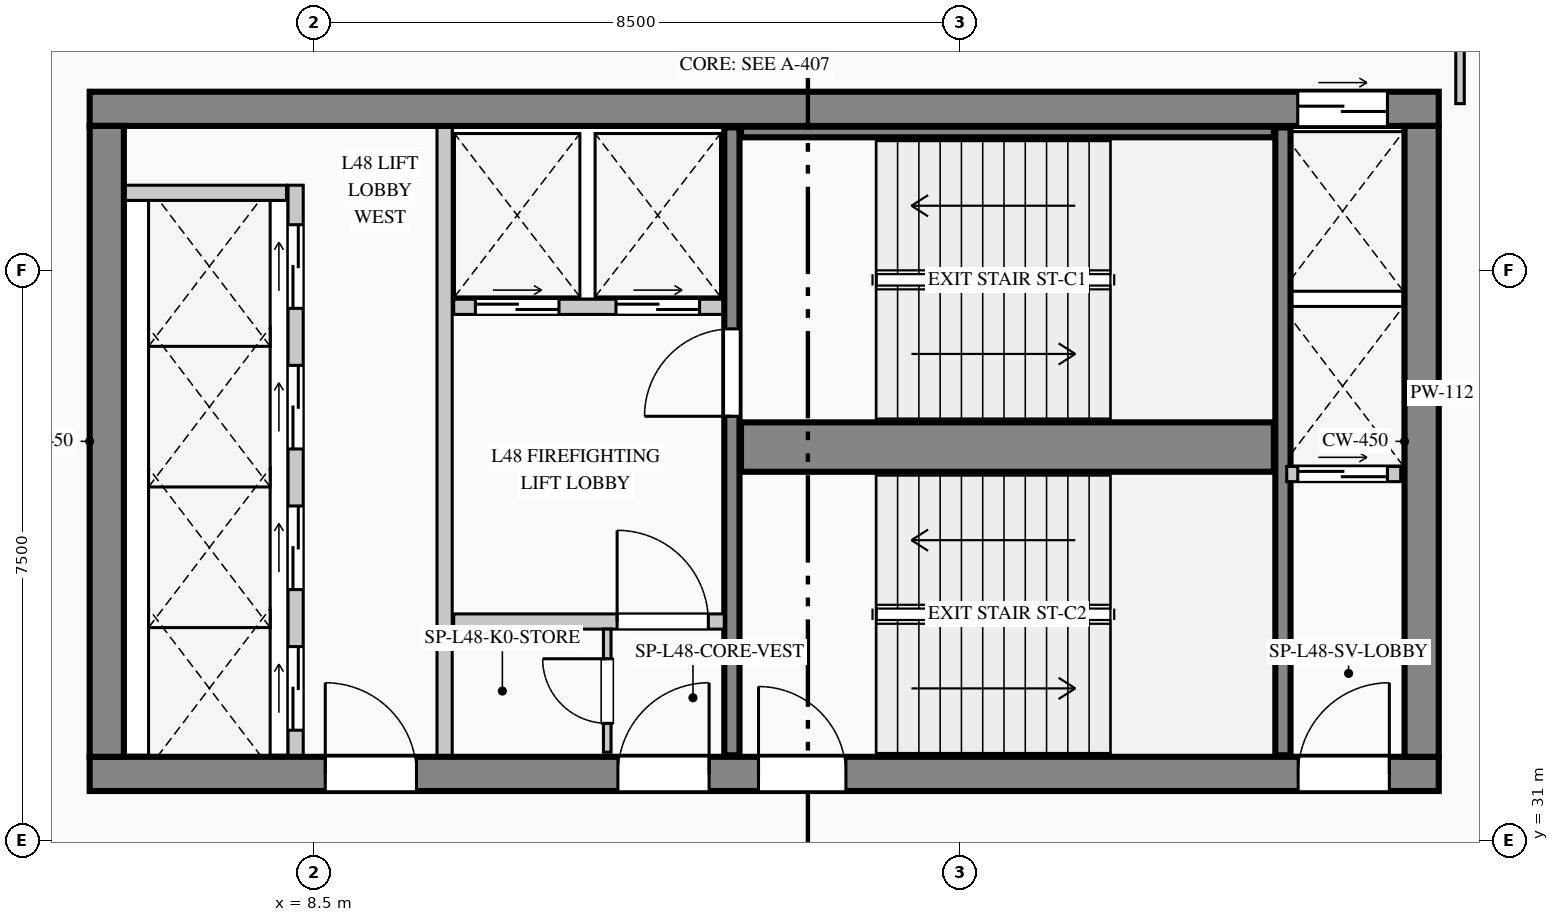
"""IFC4 building model, lengths in metres.
Left out: names, types, materials, properties, quantities, classifications, styles, units other than length and angle.
Written with IfcOpenShell. Run it as: python <this file> out.ifc"""

import sys

from ifc_helpers import new_model, si_unit, direction, frame, frame_2d, origin, place, context, subcontext, project, spatial, rectangle, extrude, element, fill, save


model = new_model("IFC4")
c1 = context("Model", 3, precision=1e-05, world=origin(), true_north=direction((0.0, 1.0)))
c2 = subcontext(c1, "Body", "Model", "MODEL_VIEW")
j1 = project(units=[si_unit("LENGTHUNIT", "METRE"), si_unit("PLANEANGLEUNIT", "RADIAN")], contexts=[c1])
p1 = place(None, origin())
s1 = spatial("IfcSite", under=j1, at=p1, CompositionType="ELEMENT")
p2 = place(p1, origin())
s2 = spatial("IfcBuilding", under=s1, at=p2, CompositionType="ELEMENT")
p3 = place(p2, frame((0.0, 0.0, 203.5)))
s3 = spatial("IfcBuildingStorey", under=s2, at=p3, CompositionType="ELEMENT", Elevation=203.5)
p4 = place(p3, frame((5.55, 40.625, 0.0), z_axis=(0.0, 0.0, 1.0), x_axis=(1.0, 0.0, 0.0)))
e1 = element("IfcWall", 1, at=p4, inside=s3, PredefinedType="SHEAR", context=c2, shape_type="SweptSolid", body=[
    extrude(rectangle(XDim=17.75, YDim=0.45, at=frame_2d((8.875, 0.0))), origin(), (0.0, 0.0, 1.0), 3.95),
])
p5 = place(p4, frame((15.895, 0.0, 0.0)))
e2 = element("IfcOpeningElement", 2, at=p5, cuts=e1, PredefinedType="OPENING", context=c2, shape_type="SweptSolid", body=[
    extrude(rectangle(XDim=1.18, YDim=2.25, at=frame_2d((0.59, 1.125))), frame((0.0, 0.235, 0.0), z_axis=(0.0, -1.0, 0.0), x_axis=(1.0, 0.0, 0.0)), (0.0, 0.0, 1.0), 0.47),
])
p6 = place(p3, frame((5.55, 31.875, 0.0), z_axis=(0.0, 0.0, 1.0), x_axis=(1.0, 0.0, 0.0)))
e3 = element("IfcWall", 3, at=p6, inside=s3, PredefinedType="SHEAR", context=c2, shape_type="SweptSolid", body=[
    extrude(rectangle(XDim=17.75, YDim=0.45, at=frame_2d((8.875, 0.0))), origin(), (0.0, 0.0, 1.0), 3.95),
])
p7 = place(p6, frame((3.1, 0.0, 0.0)))
e4 = element("IfcOpeningElement", 4, at=p7, cuts=e3, PredefinedType="OPENING", context=c2, shape_type="SweptSolid", body=[
    extrude(rectangle(XDim=1.2, YDim=2.2, at=frame_2d((0.6, 1.1))), frame((0.0, 0.235, 0.0), z_axis=(0.0, -1.0, 0.0), x_axis=(1.0, 0.0, 0.0)), (0.0, 0.0, 1.0), 0.47),
])
p8 = place(p6, frame((6.95, 0.0, 0.0)))
e5 = element("IfcOpeningElement", 5, at=p8, cuts=e3, PredefinedType="OPENING", context=c2, shape_type="SweptSolid", body=[
    extrude(rectangle(XDim=1.2, YDim=2.2, at=frame_2d((0.6, 1.1))), frame((0.0, 0.235, 0.0), z_axis=(0.0, -1.0, 0.0), x_axis=(1.0, 0.0, 0.0)), (0.0, 0.0, 1.0), 0.47),
])
p9 = place(p6, frame((8.8, 0.0, 0.0)))
e6 = element("IfcOpeningElement", 6, at=p9, cuts=e3, PredefinedType="OPENING", context=c2, shape_type="SweptSolid", body=[
    extrude(rectangle(XDim=1.15, YDim=2.2, at=frame_2d((0.575, 1.1))), frame((0.0, 0.235, 0.0), z_axis=(0.0, -1.0, 0.0), x_axis=(1.0, 0.0, 0.0)), (0.0, 0.0, 1.0), 0.47),
])
p10 = place(p6, frame((15.9, 0.0, 0.0)))
e7 = element("IfcOpeningElement", 7, at=p10, cuts=e3, PredefinedType="OPENING", context=c2, shape_type="SweptSolid", body=[
    extrude(rectangle(XDim=1.2, YDim=2.2, at=frame_2d((0.6, 1.1))), frame((0.0, 0.235, 0.0), z_axis=(0.0, -1.0, 0.0), x_axis=(1.0, 0.0, 0.0)), (0.0, 0.0, 1.0), 0.47),
])
for number, where, z_axis, x_axis in (
    (8, (5.775, 32.1, 0.0), (0.0, 0.0, 1.0), (0.0, 1.0, 0.0)),
    (9, (23.075, 32.1, 0.0), (0.0, 0.0, 1.0), (0.0, 1.0, 0.0)),
):
    element("IfcWall", number, at=place(p3, frame(where, z_axis=z_axis, x_axis=x_axis)), inside=s3, PredefinedType="SHEAR", context=c2, shape_type="SweptSolid", body=[
        extrude(rectangle(XDim=8.3, YDim=0.45, at=frame_2d((4.15, 0.0))), origin(), (0.0, 0.0, 1.0), 3.95),
    ])
p11 = place(p3, frame((14.0, 32.12, 0.0), z_axis=(0.0, 0.0, 1.0), x_axis=(0.0, 1.0, 0.0)))
e10 = element("IfcWall", 10, at=p11, inside=s3, PredefinedType="SHEAR", context=c2, shape_type="SweptSolid", body=[
    extrude(rectangle(XDim=8.26, YDim=0.2, at=frame_2d((4.13, 0.0))), origin(), (0.0, 0.0, 1.0), 3.95),
])
p12 = place(p11, frame((4.46, 0.0, 0.0)))
e11 = element("IfcOpeningElement", 11, at=p12, cuts=e10, PredefinedType="OPENING", context=c2, shape_type="SweptSolid", body=[
    extrude(rectangle(XDim=1.15, YDim=2.2, at=frame_2d((0.575, 1.1))), frame((0.0, 0.11, 0.0), z_axis=(0.0, -1.0, 0.0), x_axis=(1.0, 0.0, 0.0)), (0.0, 0.0, 1.0), 0.22),
])
p13 = place(p3, frame((14.12, 36.175, 0.0), z_axis=(0.0, 0.0, 1.0), x_axis=(1.0, 0.0, 0.0)))
e12 = element("IfcWall", 12, at=p13, inside=s3, PredefinedType="SHEAR", context=c2, shape_type="SweptSolid", body=[
    extrude(rectangle(XDim=7.01, YDim=0.65, at=frame_2d((3.505, 0.0))), origin(), (0.0, 0.0, 1.0), 3.95),
])
p14 = place(p3, frame((21.25, 32.12, 0.0), z_axis=(0.0, 0.0, 1.0), x_axis=(0.0, 1.0, 0.0)))
e13 = element("IfcWall", 13, at=p14, inside=s3, PredefinedType="SHEAR", context=c2, shape_type="SweptSolid", body=[
    extrude(rectangle(XDim=8.26, YDim=0.2, at=frame_2d((4.13, 0.0))), origin(), (0.0, 0.0, 1.0), 3.95),
])
p15 = place(p3, frame((14.12, 40.32, 0.0), z_axis=(0.0, 0.0, 1.0), x_axis=(1.0, 0.0, 0.0)))
e14 = element("IfcWall", 14, at=p15, inside=s3, PredefinedType="SHEAR", context=c2, shape_type="SweptSolid", body=[
    extrude(rectangle(XDim=7.01, YDim=0.14, at=frame_2d((3.505, 0.0))), origin(), (0.0, 0.0, 1.0), 3.95),
])
p16 = place(p3, frame((7.469, 4.63, 0.0), z_axis=(0.0, 0.0, 1.0), x_axis=(-0.123515300309, 0.992342667928, 0.0)))
e15 = element("IfcWall", 15, at=p16, inside=s3, PredefinedType="STANDARD", context=c2, shape_type="SweptSolid", body=[
    extrude(rectangle(XDim=37.024, YDim=0.26, at=frame_2d((18.512, 0.0))), origin(), (0.0, 0.0, 1.0), 3.7),
])
p17 = place(p16, frame((11.978, 0.0, 0.9)))
e16 = element("IfcOpeningElement", 16, at=p17, cuts=e15, PredefinedType="OPENING", context=c2, shape_type="SweptSolid", body=[
    extrude(rectangle(XDim=2.7, YDim=2.1, at=frame_2d((1.35, 1.05))), frame((0.0, 0.14, 0.0), z_axis=(0.0, -1.0, 0.0), x_axis=(1.0, 0.0, 0.0)), (0.0, 0.0, 1.0), 0.28),
])
p18 = place(p3, frame((8.26, 32.12, 0.0), z_axis=(0.0, 0.0, 1.0), x_axis=(0.0, 1.0, 0.0)))
e17 = element("IfcWall", 17, at=p18, inside=s3, PredefinedType="PARTITIONING", context=c2, shape_type="SweptSolid", body=[
    extrude(rectangle(XDim=7.5, YDim=0.2, at=frame_2d((3.75, 0.0))), origin(), (0.0, 0.0, 1.0), 3.7),
])
p19 = place(p18, frame((0.33, 0.0, 0.0)))
e18 = element("IfcOpeningElement", 18, at=p19, cuts=e17, PredefinedType="OPENING", context=c2, shape_type="SweptSolid", body=[
    extrude(rectangle(XDim=1.1, YDim=2.2, at=frame_2d((0.55, 1.1))), frame((0.0, 0.11, 0.0), z_axis=(0.0, -1.0, 0.0), x_axis=(1.0, 0.0, 0.0)), (0.0, 0.0, 1.0), 0.22),
])
p20 = place(p18, frame((2.18, 0.0, 0.0)))
e19 = element("IfcOpeningElement", 19, at=p20, cuts=e17, PredefinedType="OPENING", context=c2, shape_type="SweptSolid", body=[
    extrude(rectangle(XDim=1.1, YDim=2.2, at=frame_2d((0.55, 1.1))), frame((0.0, 0.11, 0.0), z_axis=(0.0, -1.0, 0.0), x_axis=(1.0, 0.0, 0.0)), (0.0, 0.0, 1.0), 0.22),
])
p21 = place(p18, frame((4.03, 0.0, 0.0)))
e20 = element("IfcOpeningElement", 20, at=p21, cuts=e17, PredefinedType="OPENING", context=c2, shape_type="SweptSolid", body=[
    extrude(rectangle(XDim=1.1, YDim=2.2, at=frame_2d((0.55, 1.1))), frame((0.0, 0.11, 0.0), z_axis=(0.0, -1.0, 0.0), x_axis=(1.0, 0.0, 0.0)), (0.0, 0.0, 1.0), 0.22),
])
p22 = place(p18, frame((5.88, 0.0, 0.0)))
e21 = element("IfcOpeningElement", 21, at=p22, cuts=e17, PredefinedType="OPENING", context=c2, shape_type="SweptSolid", body=[
    extrude(rectangle(XDim=1.1, YDim=2.2, at=frame_2d((0.55, 1.1))), frame((0.0, 0.11, 0.0), z_axis=(0.0, -1.0, 0.0), x_axis=(1.0, 0.0, 0.0)), (0.0, 0.0, 1.0), 0.22),
])
p23 = place(p3, frame((6.02, 39.52, 0.0), z_axis=(0.0, 0.0, 1.0), x_axis=(1.0, 0.0, 0.0)))
e22 = element("IfcWall", 22, at=p23, inside=s3, PredefinedType="PARTITIONING", context=c2, shape_type="SweptSolid", body=[
    extrude(rectangle(XDim=2.12, YDim=0.2, at=frame_2d((1.06, 0.0))), origin(), (0.0, 0.0, 1.0), 3.7),
])
p24 = place(p3, frame((10.22, 32.12, 0.0), z_axis=(0.0, 0.0, 1.0), x_axis=(0.0, 1.0, 0.0)))
e23 = element("IfcWall", 23, at=p24, inside=s3, PredefinedType="PARTITIONING", context=c2, shape_type="SweptSolid", body=[
    extrude(rectangle(XDim=8.26, YDim=0.2, at=frame_2d((4.13, 0.0))), origin(), (0.0, 0.0, 1.0), 3.7),
])
p25 = place(p3, frame((10.34, 38.02, 0.0), z_axis=(0.0, 0.0, 1.0), x_axis=(1.0, 0.0, 0.0)))
e24 = element("IfcWall", 24, at=p25, inside=s3, PredefinedType="PARTITIONING", context=c2, shape_type="SweptSolid", body=[
    extrude(rectangle(XDim=3.54, YDim=0.2, at=frame_2d((1.77, 0.0))), origin(), (0.0, 0.0, 1.0), 3.7),
])
p26 = place(p25, frame((0.285, 0.0, 0.0)))
e25 = element("IfcOpeningElement", 25, at=p26, cuts=e24, PredefinedType="OPENING", context=c2, shape_type="SweptSolid", body=[
    extrude(rectangle(XDim=1.1, YDim=2.2, at=frame_2d((0.55, 1.1))), frame((0.0, 0.11, 0.0), z_axis=(0.0, -1.0, 0.0), x_axis=(1.0, 0.0, 0.0)), (0.0, 0.0, 1.0), 0.22),
])
p27 = place(p25, frame((2.135, 0.0, 0.0)))
e26 = element("IfcOpeningElement", 26, at=p27, cuts=e24, PredefinedType="OPENING", context=c2, shape_type="SweptSolid", body=[
    extrude(rectangle(XDim=1.1, YDim=2.2, at=frame_2d((0.55, 1.1))), frame((0.0, 0.11, 0.0), z_axis=(0.0, -1.0, 0.0), x_axis=(1.0, 0.0, 0.0)), (0.0, 0.0, 1.0), 0.22),
])
p28 = place(p3, frame((10.34, 33.88, 0.0), z_axis=(0.0, 0.0, 1.0), x_axis=(1.0, 0.0, 0.0)))
e27 = element("IfcWall", 27, at=p28, inside=s3, PredefinedType="PARTITIONING", context=c2, shape_type="SweptSolid", body=[
    extrude(rectangle(XDim=3.56, YDim=0.2, at=frame_2d((1.78, 0.0))), origin(), (0.0, 0.0, 1.0), 3.7),
])
p29 = place(p28, frame((2.15, 0.0, 0.0)))
e28 = element("IfcOpeningElement", 28, at=p29, cuts=e27, PredefinedType="OPENING", context=c2, shape_type="SweptSolid", body=[
    extrude(rectangle(XDim=1.2, YDim=2.2, at=frame_2d((0.6, 1.1))), frame((0.0, 0.11, 0.0), z_axis=(0.0, -1.0, 0.0), x_axis=(1.0, 0.0, 0.0)), (0.0, 0.0, 1.0), 0.22),
])
p30 = place(p3, frame((12.36, 32.16, 0.0), z_axis=(0.0, 0.0, 1.0), x_axis=(0.0, 1.0, 0.0)))
e29 = element("IfcWall", 29, at=p30, inside=s3, PredefinedType="PARTITIONING", context=c2, shape_type="SweptSolid", body=[
    extrude(rectangle(XDim=1.62, YDim=0.1, at=frame_2d((0.81, 0.0))), origin(), (0.0, 0.0, 1.0), 3.7),
])
p31 = place(p30, frame((0.38, 0.0, 0.0)))
e30 = element("IfcOpeningElement", 30, at=p31, cuts=e29, PredefinedType="OPENING", context=c2, shape_type="SweptSolid", body=[
    extrude(rectangle(XDim=0.85, YDim=2.1, at=frame_2d((0.425, 1.05))), frame((0.0, 0.06, 0.0), z_axis=(0.0, -1.0, 0.0), x_axis=(1.0, 0.0, 0.0)), (0.0, 0.0, 1.0), 0.12),
])
p32 = place(p3, frame((21.3, 35.82, 0.0), z_axis=(0.0, 0.0, 1.0), x_axis=(1.0, 0.0, 0.0)))
e31 = element("IfcWall", 31, at=p32, inside=s3, PredefinedType="PARTITIONING", context=c2, shape_type="SweptSolid", body=[
    extrude(rectangle(XDim=1.5, YDim=0.2, at=frame_2d((0.75, 0.0))), origin(), (0.0, 0.0, 1.0), 3.7),
])
p33 = place(p32, frame((0.145, 0.0, 0.0)))
e32 = element("IfcOpeningElement", 32, at=p33, cuts=e31, PredefinedType="OPENING", context=c2, shape_type="SweptSolid", body=[
    extrude(rectangle(XDim=1.18, YDim=2.25, at=frame_2d((0.59, 1.125))), frame((0.0, 0.11, 0.0), z_axis=(0.0, -1.0, 0.0), x_axis=(1.0, 0.0, 0.0)), (0.0, 0.0, 1.0), 0.22),
])
p34 = place(p3, frame((23.58, 40.693, 0.0), z_axis=(0.0, 0.0, 1.0), x_axis=(0.0, 1.0, 0.0)))
e33 = element("IfcWall", 33, at=p34, inside=s3, PredefinedType="PARTITIONING", context=c2, shape_type="SweptSolid", body=[
    extrude(rectangle(XDim=2.542, YDim=0.112, at=frame_2d((1.271, 0.0))), origin(), (0.0, 0.0, 1.0), 3.7),
])
p35 = place(p7, origin())
e34 = element("IfcDoor", 34, at=p35, inside=s3, OperationType="SINGLE_SWING_LEFT", PredefinedType="DOOR", context=c2, shape_type="SweptSolid", body=[
    extrude(rectangle(XDim=1.2, YDim=2.2, at=frame_2d((0.6, 1.1))), frame((0.0, 0.025, 0.0), z_axis=(0.0, -1.0, 0.0), x_axis=(1.0, 0.0, 0.0)), (0.0, 0.0, 1.0), 0.05),
])
fill(e4, e34)
p36 = place(p8, origin())
e35 = element("IfcDoor", 35, at=p36, inside=s3, OperationType="SINGLE_SWING_RIGHT", PredefinedType="DOOR", context=c2, shape_type="SweptSolid", body=[
    extrude(rectangle(XDim=1.2, YDim=2.2, at=frame_2d((0.6, 1.1))), frame((0.0, 0.025, 0.0), z_axis=(0.0, -1.0, 0.0), x_axis=(1.0, 0.0, 0.0)), (0.0, 0.0, 1.0), 0.05),
])
fill(e5, e35)
p37 = place(p9, origin())
e36 = element("IfcDoor", 36, at=p37, inside=s3, OperationType="SINGLE_SWING_LEFT", PredefinedType="DOOR", context=c2, shape_type="SweptSolid", body=[
    extrude(rectangle(XDim=1.15, YDim=2.2, at=frame_2d((0.575, 1.1))), frame((0.0, 0.025, 0.0), z_axis=(0.0, -1.0, 0.0), x_axis=(1.0, 0.0, 0.0)), (0.0, 0.0, 1.0), 0.05),
])
fill(e6, e36)
p38 = place(p10, origin())
e37 = element("IfcDoor", 37, at=p38, inside=s3, OperationType="SINGLE_SWING_RIGHT", PredefinedType="DOOR", context=c2, shape_type="SweptSolid", body=[
    extrude(rectangle(XDim=1.2, YDim=2.2, at=frame_2d((0.6, 1.1))), frame((0.0, 0.025, 0.0), z_axis=(0.0, -1.0, 0.0), x_axis=(1.0, 0.0, 0.0)), (0.0, 0.0, 1.0), 0.05),
])
fill(e7, e37)
p39 = place(p29, origin())
e38 = element("IfcDoor", 38, at=p39, inside=s3, OperationType="SINGLE_SWING_LEFT", PredefinedType="DOOR", context=c2, shape_type="SweptSolid", body=[
    extrude(rectangle(XDim=1.2, YDim=2.2, at=frame_2d((0.6, 1.1))), frame((0.0, 0.025, 0.0), z_axis=(0.0, -1.0, 0.0), x_axis=(1.0, 0.0, 0.0)), (0.0, 0.0, 1.0), 0.05),
])
fill(e28, e38)
p40 = place(p31, origin())
e39 = element("IfcDoor", 39, at=p40, inside=s3, OperationType="SINGLE_SWING_RIGHT", PredefinedType="DOOR", context=c2, shape_type="SweptSolid", body=[
    extrude(rectangle(XDim=0.85, YDim=2.1, at=frame_2d((0.425, 1.05))), frame((0.0, 0.025, 0.0), z_axis=(0.0, -1.0, 0.0), x_axis=(1.0, 0.0, 0.0)), (0.0, 0.0, 1.0), 0.05),
])
fill(e30, e39)
p41 = place(p12, origin())
e40 = element("IfcDoor", 40, at=p41, inside=s3, OperationType="SINGLE_SWING_LEFT", PredefinedType="DOOR", context=c2, shape_type="SweptSolid", body=[
    extrude(rectangle(XDim=1.15, YDim=2.2, at=frame_2d((0.575, 1.1))), frame((0.0, 0.025, 0.0), z_axis=(0.0, -1.0, 0.0), x_axis=(1.0, 0.0, 0.0)), (0.0, 0.0, 1.0), 0.05),
])
fill(e11, e40)
p42 = place(p19, origin())
e41 = element("IfcDoor", 41, at=p42, inside=s3, OperationType="DOUBLE_DOOR_SLIDING", PredefinedType="DOOR", context=c2, shape_type="SweptSolid", body=[
    extrude(rectangle(XDim=1.1, YDim=2.2, at=frame_2d((0.55, 1.1))), frame((0.0, 0.025, 0.0), z_axis=(0.0, -1.0, 0.0), x_axis=(1.0, 0.0, 0.0)), (0.0, 0.0, 1.0), 0.05),
])
fill(e18, e41)
p43 = place(p20, origin())
e42 = element("IfcDoor", 42, at=p43, inside=s3, OperationType="DOUBLE_DOOR_SLIDING", PredefinedType="DOOR", context=c2, shape_type="SweptSolid", body=[
    extrude(rectangle(XDim=1.1, YDim=2.2, at=frame_2d((0.55, 1.1))), frame((0.0, 0.025, 0.0), z_axis=(0.0, -1.0, 0.0), x_axis=(1.0, 0.0, 0.0)), (0.0, 0.0, 1.0), 0.05),
])
fill(e19, e42)
p44 = place(p21, origin())
e43 = element("IfcDoor", 43, at=p44, inside=s3, OperationType="DOUBLE_DOOR_SLIDING", PredefinedType="DOOR", context=c2, shape_type="SweptSolid", body=[
    extrude(rectangle(XDim=1.1, YDim=2.2, at=frame_2d((0.55, 1.1))), frame((0.0, 0.025, 0.0), z_axis=(0.0, -1.0, 0.0), x_axis=(1.0, 0.0, 0.0)), (0.0, 0.0, 1.0), 0.05),
])
fill(e20, e43)
p45 = place(p22, origin())
e44 = element("IfcDoor", 44, at=p45, inside=s3, OperationType="DOUBLE_DOOR_SLIDING", PredefinedType="DOOR", context=c2, shape_type="SweptSolid", body=[
    extrude(rectangle(XDim=1.1, YDim=2.2, at=frame_2d((0.55, 1.1))), frame((0.0, 0.025, 0.0), z_axis=(0.0, -1.0, 0.0), x_axis=(1.0, 0.0, 0.0)), (0.0, 0.0, 1.0), 0.05),
])
fill(e21, e44)
p46 = place(p26, origin())
e45 = element("IfcDoor", 45, at=p46, inside=s3, OperationType="DOUBLE_DOOR_SLIDING", PredefinedType="DOOR", context=c2, shape_type="SweptSolid", body=[
    extrude(rectangle(XDim=1.1, YDim=2.2, at=frame_2d((0.55, 1.1))), frame((0.0, 0.025, 0.0), z_axis=(0.0, -1.0, 0.0), x_axis=(1.0, 0.0, 0.0)), (0.0, 0.0, 1.0), 0.05),
])
fill(e25, e45)
p47 = place(p27, origin())
e46 = element("IfcDoor", 46, at=p47, inside=s3, OperationType="DOUBLE_DOOR_SLIDING", PredefinedType="DOOR", context=c2, shape_type="SweptSolid", body=[
    extrude(rectangle(XDim=1.1, YDim=2.2, at=frame_2d((0.55, 1.1))), frame((0.0, 0.025, 0.0), z_axis=(0.0, -1.0, 0.0), x_axis=(1.0, 0.0, 0.0)), (0.0, 0.0, 1.0), 0.05),
])
fill(e26, e46)
p48 = place(p5, origin())
e47 = element("IfcDoor", 47, at=p48, inside=s3, OperationType="DOUBLE_DOOR_SLIDING", PredefinedType="DOOR", context=c2, shape_type="SweptSolid", body=[
    extrude(rectangle(XDim=1.18, YDim=2.25, at=frame_2d((0.59, 1.125))), frame((0.0, 0.025, 0.0), z_axis=(0.0, -1.0, 0.0), x_axis=(1.0, 0.0, 0.0)), (0.0, 0.0, 1.0), 0.05),
])
fill(e2, e47)
p49 = place(p33, origin())
e48 = element("IfcDoor", 48, at=p49, inside=s3, OperationType="DOUBLE_DOOR_SLIDING", PredefinedType="DOOR", context=c2, shape_type="SweptSolid", body=[
    extrude(rectangle(XDim=1.18, YDim=2.25, at=frame_2d((0.59, 1.125))), frame((0.0, 0.025, 0.0), z_axis=(0.0, -1.0, 0.0), x_axis=(1.0, 0.0, 0.0)), (0.0, 0.0, 1.0), 0.05),
])
fill(e32, e48)
save(model, sys.argv[1])
